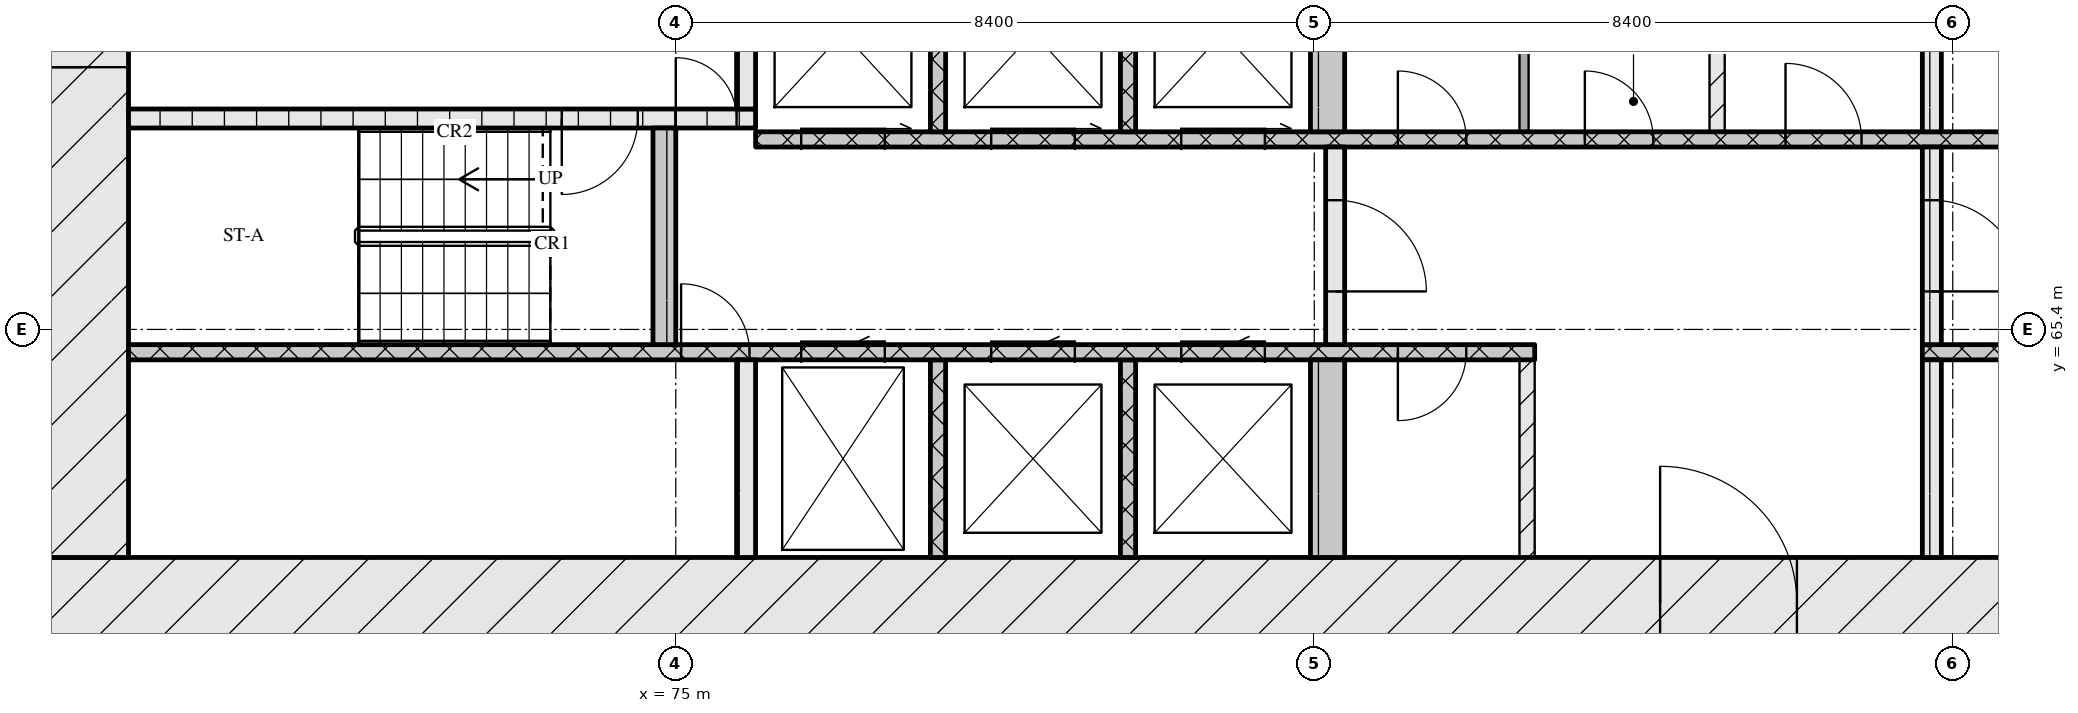
"""IFC4 building model, lengths in metres.
Left out: names, types, materials, properties, quantities, classifications, styles, units other than length and angle.
Written with IfcOpenShell. Run it as: python <this file> out.ifc"""

import sys

from ifc_helpers import new_model, si_unit, direction, frame, frame_2d, origin, place, context, subcontext, project, spatial, rectangle, extrude, element, fill, save


model = new_model("IFC4")
c1 = context("Model", 3, precision=1e-05, world=origin(), true_north=direction((0.0, 1.0)))
c2 = subcontext(c1, "Body", "Model", "MODEL_VIEW")
j1 = project(units=[si_unit("LENGTHUNIT", "METRE"), si_unit("PLANEANGLEUNIT", "RADIAN")], contexts=[c1])
p1 = place(None, origin())
s1 = spatial("IfcSite", under=j1, at=p1, CompositionType="ELEMENT")
p2 = place(p1, origin())
s2 = spatial("IfcBuilding", under=s1, at=p2, CompositionType="ELEMENT")
p3 = place(p2, frame((0.0, 0.0, 44.4)))
s3 = spatial("IfcBuildingStorey", under=s2, at=p3, CompositionType="ELEMENT", Elevation=44.4)
p4 = place(p3, frame((66.6, 61.8, 0.0), z_axis=(0.0, 0.0, 1.0), x_axis=(1.0, 0.0, 0.0)))
e1 = element("IfcWall", 1, at=p4, inside=s3, PredefinedType="SOLIDWALL", context=c2, shape_type="SweptSolid", body=[
    extrude(rectangle(XDim=42.0, YDim=1.2, at=frame_2d((21.0, 0.0))), origin(), (0.0, 0.0, 1.0), 3.32),
])
p5 = place(p4, frame((21.35, 0.0, 0.0)))
e2 = element("IfcOpeningElement", 2, at=p5, cuts=e1, PredefinedType="OPENING", context=c2, shape_type="SweptSolid", body=[
    extrude(rectangle(XDim=1.8, YDim=2.1, at=frame_2d((0.9, 1.05))), frame((0.0, 0.61, 0.0), z_axis=(0.0, -1.0, 0.0), x_axis=(1.0, 0.0, 0.0)), (0.0, 0.0, 1.0), 1.22),
])
p6 = place(p3, frame((67.2, 62.4, 0.0), z_axis=(0.0, 0.0, 1.0), x_axis=(0.0, 1.0, 0.0)))
e3 = element("IfcWall", 3, at=p6, inside=s3, PredefinedType="SOLIDWALL", context=c2, shape_type="SweptSolid", body=[
    extrude(rectangle(XDim=12.0, YDim=1.2, at=frame_2d((6.0, 0.0))), origin(), (0.0, 0.0, 1.0), 3.32),
])
p7 = place(p6, frame((6.45, 0.0, 0.0)))
e4 = element("IfcOpeningElement", 4, at=p7, cuts=e3, PredefinedType="OPENING", context=c2, shape_type="SweptSolid", body=[
    extrude(rectangle(XDim=1.2, YDim=2.1, at=frame_2d((0.6, 1.05))), frame((0.0, 0.61, 0.0), z_axis=(0.0, -1.0, 0.0), x_axis=(1.0, 0.0, 0.0)), (0.0, 0.0, 1.0), 1.22),
])
p8 = place(p3, frame((75.925, 62.4, 0.0), z_axis=(0.0, 0.0, 1.0), x_axis=(0.0, 1.0, 0.0)))
e5 = element("IfcWall", 5, at=p8, inside=s3, PredefinedType="SOLIDWALL", context=c2, shape_type="SweptSolid", body=[
    extrude(rectangle(XDim=2.6, YDim=0.25, at=frame_2d((1.3, 0.0))), origin(), (0.0, 0.0, 1.0), 3.32),
])
for number, where, z_axis, x_axis in (
    (6, (78.45, 62.4, 0.0), (0.0, 0.0, 1.0), (0.0, 1.0, 0.0)),
    (7, (80.95, 62.4, 0.0), (0.0, 0.0, 1.0), (0.0, 1.0, 0.0)),
):
    element("IfcWall", number, at=place(p3, frame(where, z_axis=z_axis, x_axis=x_axis)), inside=s3, PredefinedType="SOLIDWALL", context=c2, shape_type="SweptSolid", body=[
        extrude(rectangle(XDim=2.6, YDim=0.2, at=frame_2d((1.3, 0.0))), origin(), (0.0, 0.0, 1.0), 3.32),
    ])
p9 = place(p3, frame((83.575, 62.4, 0.0), z_axis=(0.0, 0.0, 1.0), x_axis=(0.0, 1.0, 0.0)))
e8 = element("IfcWall", 8, at=p9, inside=s3, PredefinedType="SOLIDWALL", context=c2, shape_type="SweptSolid", body=[
    extrude(rectangle(XDim=2.6, YDim=0.45, at=frame_2d((1.3, 0.0))), origin(), (0.0, 0.0, 1.0), 3.32),
])
p10 = place(p3, frame((86.2, 62.4, 0.0), z_axis=(0.0, 0.0, 1.0), x_axis=(0.0, 1.0, 0.0)))
e9 = element("IfcWall", 9, at=p10, inside=s3, PredefinedType="PARTITIONING", context=c2, shape_type="SweptSolid", body=[
    extrude(rectangle(XDim=2.6, YDim=0.2, at=frame_2d((1.3, 0.0))), origin(), (0.0, 0.0, 1.0), 3.32),
])
p11 = place(p3, frame((91.525, 62.4, 0.0), z_axis=(0.0, 0.0, 1.0), x_axis=(0.0, 1.0, 0.0)))
e10 = element("IfcWall", 10, at=p11, inside=s3, PredefinedType="SOLIDWALL", context=c2, shape_type="SweptSolid", body=[
    extrude(rectangle(XDim=2.6, YDim=0.25, at=frame_2d((1.3, 0.0))), origin(), (0.0, 0.0, 1.0), 3.32),
])
p12 = place(p3, frame((67.8, 65.1, 0.0), z_axis=(0.0, 0.0, 1.0), x_axis=(1.0, 0.0, 0.0)))
e11 = element("IfcWall", 11, at=p12, inside=s3, PredefinedType="SOLIDWALL", context=c2, shape_type="SweptSolid", body=[
    extrude(rectangle(XDim=18.5, YDim=0.2, at=frame_2d((9.25, 0.0))), origin(), (0.0, 0.0, 1.0), 3.32),
])
p13 = place(p12, frame((7.27, 0.0, 0.0)))
e12 = element("IfcOpeningElement", 12, at=p13, cuts=e11, PredefinedType="OPENING", context=c2, shape_type="SweptSolid", body=[
    extrude(rectangle(XDim=0.9, YDim=2.1, at=frame_2d((0.45, 1.05))), frame((0.0, 0.11, 0.0), z_axis=(0.0, -1.0, 0.0), x_axis=(1.0, 0.0, 0.0)), (0.0, 0.0, 1.0), 0.22),
])
p14 = place(p12, frame((8.85, 0.0, 0.0)))
e13 = element("IfcOpeningElement", 13, at=p14, cuts=e11, PredefinedType="OPENING", context=c2, shape_type="SweptSolid", body=[
    extrude(rectangle(XDim=1.1, YDim=2.1, at=frame_2d((0.55, 1.05))), frame((0.0, 0.11, 0.0), z_axis=(0.0, -1.0, 0.0), x_axis=(1.0, 0.0, 0.0)), (0.0, 0.0, 1.0), 0.22),
])
p15 = place(p12, frame((11.35, 0.0, 0.0)))
e14 = element("IfcOpeningElement", 14, at=p15, cuts=e11, PredefinedType="OPENING", context=c2, shape_type="SweptSolid", body=[
    extrude(rectangle(XDim=1.1, YDim=2.1, at=frame_2d((0.55, 1.05))), frame((0.0, 0.11, 0.0), z_axis=(0.0, -1.0, 0.0), x_axis=(1.0, 0.0, 0.0)), (0.0, 0.0, 1.0), 0.22),
])
p16 = place(p12, frame((13.85, 0.0, 0.0)))
e15 = element("IfcOpeningElement", 15, at=p16, cuts=e11, PredefinedType="OPENING", context=c2, shape_type="SweptSolid", body=[
    extrude(rectangle(XDim=1.1, YDim=2.1, at=frame_2d((0.55, 1.05))), frame((0.0, 0.11, 0.0), z_axis=(0.0, -1.0, 0.0), x_axis=(1.0, 0.0, 0.0)), (0.0, 0.0, 1.0), 0.22),
])
p17 = place(p12, frame((16.7, 0.0, 0.0)))
e16 = element("IfcOpeningElement", 16, at=p17, cuts=e11, PredefinedType="OPENING", context=c2, shape_type="SweptSolid", body=[
    extrude(rectangle(XDim=0.9, YDim=2.1, at=frame_2d((0.45, 1.05))), frame((0.0, 0.11, 0.0), z_axis=(0.0, -1.0, 0.0), x_axis=(1.0, 0.0, 0.0)), (0.0, 0.0, 1.0), 0.22),
])
p18 = place(p3, frame((91.4, 65.1, 0.0), z_axis=(0.0, 0.0, 1.0), x_axis=(1.0, 0.0, 0.0)))
e17 = element("IfcWall", 17, at=p18, inside=s3, PredefinedType="SOLIDWALL", context=c2, shape_type="SweptSolid", body=[
    extrude(rectangle(XDim=16.0, YDim=0.2, at=frame_2d((8.0, 0.0))), origin(), (0.0, 0.0, 1.0), 3.32),
])
p19 = place(p18, frame((7.83, 0.0, 0.0)))
e18 = element("IfcOpeningElement", 18, at=p19, cuts=e17, PredefinedType="OPENING", context=c2, shape_type="SweptSolid", body=[
    extrude(rectangle(XDim=0.9, YDim=2.1, at=frame_2d((0.45, 1.05))), frame((0.0, 0.11, 0.0), z_axis=(0.0, -1.0, 0.0), x_axis=(1.0, 0.0, 0.0)), (0.0, 0.0, 1.0), 0.22),
])
p20 = place(p3, frame((74.85, 65.2, 0.0), z_axis=(0.0, 0.0, 1.0), x_axis=(0.0, 1.0, 0.0)))
e19 = element("IfcWall", 19, at=p20, inside=s3, PredefinedType="SOLIDWALL", context=c2, shape_type="SweptSolid", body=[
    extrude(rectangle(XDim=2.85, YDim=0.3, at=frame_2d((1.425, 0.0))), origin(), (0.0, 0.0, 1.0), 3.32),
])
p21 = place(p3, frame((83.675, 65.2, 0.0), z_axis=(0.0, 0.0, 1.0), x_axis=(0.0, 1.0, 0.0)))
e20 = element("IfcWall", 20, at=p21, inside=s3, PredefinedType="SOLIDWALL", context=c2, shape_type="SweptSolid", body=[
    extrude(rectangle(XDim=2.6, YDim=0.25, at=frame_2d((1.3, 0.0))), origin(), (0.0, 0.0, 1.0), 3.32),
])
p22 = place(p21, frame((0.7, 0.0, 0.0)))
e21 = element("IfcOpeningElement", 21, at=p22, cuts=e20, PredefinedType="OPENING", context=c2, shape_type="SweptSolid", body=[
    extrude(rectangle(XDim=1.2, YDim=2.1, at=frame_2d((0.6, 1.05))), frame((0.0, 0.135, 0.0), z_axis=(0.0, -1.0, 0.0), x_axis=(1.0, 0.0, 0.0)), (0.0, 0.0, 1.0), 0.27),
])
p23 = place(p3, frame((91.525, 65.2, 0.0), z_axis=(0.0, 0.0, 1.0), x_axis=(0.0, 1.0, 0.0)))
e22 = element("IfcWall", 22, at=p23, inside=s3, PredefinedType="SOLIDWALL", context=c2, shape_type="SweptSolid", body=[
    extrude(rectangle(XDim=2.6, YDim=0.25, at=frame_2d((1.3, 0.0))), origin(), (0.0, 0.0, 1.0), 3.32),
])
p24 = place(p23, frame((0.7, 0.0, 0.0)))
e23 = element("IfcOpeningElement", 23, at=p24, cuts=e22, PredefinedType="OPENING", context=c2, shape_type="SweptSolid", body=[
    extrude(rectangle(XDim=1.2, YDim=2.1, at=frame_2d((0.6, 1.05))), frame((0.0, 0.135, 0.0), z_axis=(0.0, -1.0, 0.0), x_axis=(1.0, 0.0, 0.0)), (0.0, 0.0, 1.0), 0.27),
])
p25 = place(p3, frame((76.05, 67.9, 0.0), z_axis=(0.0, 0.0, 1.0), x_axis=(1.0, 0.0, 0.0)))
e24 = element("IfcWall", 24, at=p25, inside=s3, PredefinedType="SOLIDWALL", context=c2, shape_type="SweptSolid", body=[
    extrude(rectangle(XDim=23.1, YDim=0.2, at=frame_2d((11.55, 0.0))), origin(), (0.0, 0.0, 1.0), 3.32),
])
p26 = place(p25, frame((0.6, 0.0, 0.0)))
e25 = element("IfcOpeningElement", 25, at=p26, cuts=e24, PredefinedType="OPENING", context=c2, shape_type="SweptSolid", body=[
    extrude(rectangle(XDim=1.1, YDim=2.1, at=frame_2d((0.55, 1.05))), frame((0.0, 0.11, 0.0), z_axis=(0.0, -1.0, 0.0), x_axis=(1.0, 0.0, 0.0)), (0.0, 0.0, 1.0), 0.22),
])
p27 = place(p25, frame((3.1, 0.0, 0.0)))
e26 = element("IfcOpeningElement", 26, at=p27, cuts=e24, PredefinedType="OPENING", context=c2, shape_type="SweptSolid", body=[
    extrude(rectangle(XDim=1.1, YDim=2.1, at=frame_2d((0.55, 1.05))), frame((0.0, 0.11, 0.0), z_axis=(0.0, -1.0, 0.0), x_axis=(1.0, 0.0, 0.0)), (0.0, 0.0, 1.0), 0.22),
])
p28 = place(p25, frame((5.6, 0.0, 0.0)))
e27 = element("IfcOpeningElement", 27, at=p28, cuts=e24, PredefinedType="OPENING", context=c2, shape_type="SweptSolid", body=[
    extrude(rectangle(XDim=1.1, YDim=2.1, at=frame_2d((0.55, 1.05))), frame((0.0, 0.11, 0.0), z_axis=(0.0, -1.0, 0.0), x_axis=(1.0, 0.0, 0.0)), (0.0, 0.0, 1.0), 0.22),
])
p29 = place(p25, frame((8.45, 0.0, 0.0)))
e28 = element("IfcOpeningElement", 28, at=p29, cuts=e24, PredefinedType="OPENING", context=c2, shape_type="SweptSolid", body=[
    extrude(rectangle(XDim=0.9, YDim=2.1, at=frame_2d((0.45, 1.05))), frame((0.0, 0.11, 0.0), z_axis=(0.0, -1.0, 0.0), x_axis=(1.0, 0.0, 0.0)), (0.0, 0.0, 1.0), 0.22),
])
p30 = place(p25, frame((10.91, 0.0, 0.0)))
e29 = element("IfcOpeningElement", 29, at=p30, cuts=e24, PredefinedType="OPENING", context=c2, shape_type="SweptSolid", body=[
    extrude(rectangle(XDim=0.9, YDim=2.1, at=frame_2d((0.45, 1.05))), frame((0.0, 0.11, 0.0), z_axis=(0.0, -1.0, 0.0), x_axis=(1.0, 0.0, 0.0)), (0.0, 0.0, 1.0), 0.22),
])
p31 = place(p25, frame((13.55, 0.0, 0.0)))
e30 = element("IfcOpeningElement", 30, at=p31, cuts=e24, PredefinedType="OPENING", context=c2, shape_type="SweptSolid", body=[
    extrude(rectangle(XDim=1.0, YDim=2.1, at=frame_2d((0.5, 1.05))), frame((0.0, 0.11, 0.0), z_axis=(0.0, -1.0, 0.0), x_axis=(1.0, 0.0, 0.0)), (0.0, 0.0, 1.0), 0.22),
])
for number, where, z_axis, x_axis in (
    (31, (78.45, 68.0, 0.0), (0.0, 0.0, 1.0), (0.0, 1.0, 0.0)),
    (32, (80.95, 68.0, 0.0), (0.0, 0.0, 1.0), (0.0, 1.0, 0.0)),
):
    element("IfcWall", number, at=place(p3, frame(where, z_axis=z_axis, x_axis=x_axis)), inside=s3, PredefinedType="SOLIDWALL", context=c2, shape_type="SweptSolid", body=[
        extrude(rectangle(XDim=2.6, YDim=0.2, at=frame_2d((1.3, 0.0))), origin(), (0.0, 0.0, 1.0), 3.32),
    ])
p32 = place(p3, frame((83.575, 68.0, 0.0), z_axis=(0.0, 0.0, 1.0), x_axis=(0.0, 1.0, 0.0)))
e33 = element("IfcWall", 33, at=p32, inside=s3, PredefinedType="SOLIDWALL", context=c2, shape_type="SweptSolid", body=[
    extrude(rectangle(XDim=2.6, YDim=0.45, at=frame_2d((1.3, 0.0))), origin(), (0.0, 0.0, 1.0), 3.32),
])
p33 = place(p3, frame((86.16, 68.0, 0.0), z_axis=(0.0, 0.0, 1.0), x_axis=(0.0, 1.0, 0.0)))
e34 = element("IfcWall", 34, at=p33, inside=s3, PredefinedType="PARTITIONING", context=c2, shape_type="SweptSolid", body=[
    extrude(rectangle(XDim=2.6, YDim=0.12, at=frame_2d((1.3, 0.0))), origin(), (0.0, 0.0, 1.0), 3.32),
])
p34 = place(p3, frame((88.7, 68.0, 0.0), z_axis=(0.0, 0.0, 1.0), x_axis=(0.0, 1.0, 0.0)))
e35 = element("IfcWall", 35, at=p34, inside=s3, PredefinedType="PARTITIONING", context=c2, shape_type="SweptSolid", body=[
    extrude(rectangle(XDim=2.6, YDim=0.2, at=frame_2d((1.3, 0.0))), origin(), (0.0, 0.0, 1.0), 3.32),
])
p35 = place(p3, frame((91.525, 68.0, 0.0), z_axis=(0.0, 0.0, 1.0), x_axis=(0.0, 1.0, 0.0)))
e36 = element("IfcWall", 36, at=p35, inside=s3, PredefinedType="SOLIDWALL", context=c2, shape_type="SweptSolid", body=[
    extrude(rectangle(XDim=2.6, YDim=0.25, at=frame_2d((1.3, 0.0))), origin(), (0.0, 0.0, 1.0), 3.32),
])
p36 = place(p3, frame((67.8, 68.175, 0.0), z_axis=(0.0, 0.0, 1.0), x_axis=(1.0, 0.0, 0.0)))
e37 = element("IfcWall", 37, at=p36, inside=s3, PredefinedType="SOLIDWALL", context=c2, shape_type="SweptSolid", body=[
    extrude(rectangle(XDim=8.25, YDim=0.25, at=frame_2d((4.125, 0.0))), origin(), (0.0, 0.0, 1.0), 3.32),
])
p37 = place(p36, frame((5.7, 0.0, 0.0)))
e38 = element("IfcOpeningElement", 38, at=p37, cuts=e37, PredefinedType="OPENING", context=c2, shape_type="SweptSolid", body=[
    extrude(rectangle(XDim=1.0, YDim=2.1, at=frame_2d((0.5, 1.05))), frame((0.0, 0.135, 0.0), z_axis=(0.0, -1.0, 0.0), x_axis=(1.0, 0.0, 0.0)), (0.0, 0.0, 1.0), 0.27),
])
p38 = place(p36, frame((7.2, 0.0, 0.0)))
e39 = element("IfcOpeningElement", 39, at=p38, cuts=e37, PredefinedType="OPENING", context=c2, shape_type="SweptSolid", body=[
    extrude(rectangle(XDim=0.8, YDim=2.1, at=frame_2d((0.4, 1.05))), frame((0.0, 0.135, 0.0), z_axis=(0.0, -1.0, 0.0), x_axis=(1.0, 0.0, 0.0)), (0.0, 0.0, 1.0), 0.27),
])
p39 = place(p3, frame((75.925, 68.3, 0.0), z_axis=(0.0, 0.0, 1.0), x_axis=(0.0, 1.0, 0.0)))
e40 = element("IfcWall", 40, at=p39, inside=s3, PredefinedType="SOLIDWALL", context=c2, shape_type="SweptSolid", body=[
    extrude(rectangle(XDim=2.3, YDim=0.25, at=frame_2d((1.15, 0.0))), origin(), (0.0, 0.0, 1.0), 3.32),
])
p40 = place(p5, origin())
e41 = element("IfcDoor", 41, at=p40, inside=s3, OperationType="DOUBLE_DOOR_SINGLE_SWING", PredefinedType="DOOR", context=c2, shape_type="SweptSolid", body=[
    extrude(rectangle(XDim=1.8, YDim=2.1, at=frame_2d((0.9, 1.05))), frame((0.0, 0.025, 0.0), z_axis=(0.0, -1.0, 0.0), x_axis=(1.0, 0.0, 0.0)), (0.0, 0.0, 1.0), 0.05),
])
fill(e2, e41)
p41 = place(p13, origin())
e42 = element("IfcDoor", 42, at=p41, inside=s3, OperationType="SINGLE_SWING_LEFT", PredefinedType="DOOR", context=c2, shape_type="SweptSolid", body=[
    extrude(rectangle(XDim=0.9, YDim=2.1, at=frame_2d((0.45, 1.05))), frame((0.0, 0.025, 0.0), z_axis=(0.0, -1.0, 0.0), x_axis=(1.0, 0.0, 0.0)), (0.0, 0.0, 1.0), 0.05),
])
fill(e12, e42)
p42 = place(p14, origin())
e43 = element("IfcDoor", 43, at=p42, inside=s3, OperationType="SLIDING_TO_LEFT", PredefinedType="DOOR", context=c2, shape_type="SweptSolid", body=[
    extrude(rectangle(XDim=1.1, YDim=2.1, at=frame_2d((0.55, 1.05))), frame((0.0, 0.025, 0.0), z_axis=(0.0, -1.0, 0.0), x_axis=(1.0, 0.0, 0.0)), (0.0, 0.0, 1.0), 0.05),
])
fill(e13, e43)
p43 = place(p15, origin())
e44 = element("IfcDoor", 44, at=p43, inside=s3, OperationType="SLIDING_TO_LEFT", PredefinedType="DOOR", context=c2, shape_type="SweptSolid", body=[
    extrude(rectangle(XDim=1.1, YDim=2.1, at=frame_2d((0.55, 1.05))), frame((0.0, 0.025, 0.0), z_axis=(0.0, -1.0, 0.0), x_axis=(1.0, 0.0, 0.0)), (0.0, 0.0, 1.0), 0.05),
])
fill(e14, e44)
p44 = place(p16, origin())
e45 = element("IfcDoor", 45, at=p44, inside=s3, OperationType="SLIDING_TO_LEFT", PredefinedType="DOOR", context=c2, shape_type="SweptSolid", body=[
    extrude(rectangle(XDim=1.1, YDim=2.1, at=frame_2d((0.55, 1.05))), frame((0.0, 0.025, 0.0), z_axis=(0.0, -1.0, 0.0), x_axis=(1.0, 0.0, 0.0)), (0.0, 0.0, 1.0), 0.05),
])
fill(e15, e45)
p45 = place(p17, origin())
e46 = element("IfcDoor", 46, at=p45, inside=s3, OperationType="SINGLE_SWING_RIGHT", PredefinedType="DOOR", context=c2, shape_type="SweptSolid", body=[
    extrude(rectangle(XDim=0.9, YDim=2.1, at=frame_2d((0.45, 1.05))), frame((0.0, 0.025, 0.0), z_axis=(0.0, -1.0, 0.0), x_axis=(1.0, 0.0, 0.0)), (0.0, 0.0, 1.0), 0.05),
])
fill(e16, e46)
p46 = place(p22, origin())
e47 = element("IfcDoor", 47, at=p46, inside=s3, OperationType="SINGLE_SWING_RIGHT", PredefinedType="DOOR", context=c2, shape_type="SweptSolid", body=[
    extrude(rectangle(XDim=1.2, YDim=2.1, at=frame_2d((0.6, 1.05))), frame((0.0, 0.025, 0.0), z_axis=(0.0, -1.0, 0.0), x_axis=(1.0, 0.0, 0.0)), (0.0, 0.0, 1.0), 0.05),
])
fill(e21, e47)
p47 = place(p24, origin())
e48 = element("IfcDoor", 48, at=p47, inside=s3, OperationType="SINGLE_SWING_RIGHT", PredefinedType="DOOR", context=c2, shape_type="SweptSolid", body=[
    extrude(rectangle(XDim=1.2, YDim=2.1, at=frame_2d((0.6, 1.05))), frame((0.0, 0.025, 0.0), z_axis=(0.0, -1.0, 0.0), x_axis=(1.0, 0.0, 0.0)), (0.0, 0.0, 1.0), 0.05),
])
fill(e23, e48)
p48 = place(p26, origin())
e49 = element("IfcDoor", 49, at=p48, inside=s3, OperationType="SLIDING_TO_RIGHT", PredefinedType="DOOR", context=c2, shape_type="SweptSolid", body=[
    extrude(rectangle(XDim=1.1, YDim=2.1, at=frame_2d((0.55, 1.05))), frame((0.0, 0.025, 0.0), z_axis=(0.0, -1.0, 0.0), x_axis=(1.0, 0.0, 0.0)), (0.0, 0.0, 1.0), 0.05),
])
fill(e25, e49)
p49 = place(p27, origin())
e50 = element("IfcDoor", 50, at=p49, inside=s3, OperationType="SLIDING_TO_RIGHT", PredefinedType="DOOR", context=c2, shape_type="SweptSolid", body=[
    extrude(rectangle(XDim=1.1, YDim=2.1, at=frame_2d((0.55, 1.05))), frame((0.0, 0.025, 0.0), z_axis=(0.0, -1.0, 0.0), x_axis=(1.0, 0.0, 0.0)), (0.0, 0.0, 1.0), 0.05),
])
fill(e26, e50)
p50 = place(p28, origin())
e51 = element("IfcDoor", 51, at=p50, inside=s3, OperationType="SLIDING_TO_RIGHT", PredefinedType="DOOR", context=c2, shape_type="SweptSolid", body=[
    extrude(rectangle(XDim=1.1, YDim=2.1, at=frame_2d((0.55, 1.05))), frame((0.0, 0.025, 0.0), z_axis=(0.0, -1.0, 0.0), x_axis=(1.0, 0.0, 0.0)), (0.0, 0.0, 1.0), 0.05),
])
fill(e27, e51)
p51 = place(p29, origin())
e52 = element("IfcDoor", 52, at=p51, inside=s3, OperationType="SINGLE_SWING_LEFT", PredefinedType="DOOR", context=c2, shape_type="SweptSolid", body=[
    extrude(rectangle(XDim=0.9, YDim=2.1, at=frame_2d((0.45, 1.05))), frame((0.0, 0.025, 0.0), z_axis=(0.0, -1.0, 0.0), x_axis=(1.0, 0.0, 0.0)), (0.0, 0.0, 1.0), 0.05),
])
fill(e28, e52)
p52 = place(p30, origin())
e53 = element("IfcDoor", 53, at=p52, inside=s3, OperationType="SINGLE_SWING_LEFT", PredefinedType="DOOR", context=c2, shape_type="SweptSolid", body=[
    extrude(rectangle(XDim=0.9, YDim=2.1, at=frame_2d((0.45, 1.05))), frame((0.0, 0.025, 0.0), z_axis=(0.0, -1.0, 0.0), x_axis=(1.0, 0.0, 0.0)), (0.0, 0.0, 1.0), 0.05),
])
fill(e29, e53)
p53 = place(p31, origin())
e54 = element("IfcDoor", 54, at=p53, inside=s3, OperationType="SINGLE_SWING_LEFT", PredefinedType="DOOR", context=c2, shape_type="SweptSolid", body=[
    extrude(rectangle(XDim=1.0, YDim=2.1, at=frame_2d((0.5, 1.05))), frame((0.0, 0.025, 0.0), z_axis=(0.0, -1.0, 0.0), x_axis=(1.0, 0.0, 0.0)), (0.0, 0.0, 1.0), 0.05),
])
fill(e30, e54)
p54 = place(p37, origin())
e55 = element("IfcDoor", 55, at=p54, inside=s3, OperationType="SINGLE_SWING_RIGHT", PredefinedType="DOOR", context=c2, shape_type="SweptSolid", body=[
    extrude(rectangle(XDim=1.0, YDim=2.1, at=frame_2d((0.5, 1.05))), frame((0.0, 0.025, 0.0), z_axis=(0.0, -1.0, 0.0), x_axis=(1.0, 0.0, 0.0)), (0.0, 0.0, 1.0), 0.05),
])
fill(e38, e55)
p55 = place(p38, origin())
e56 = element("IfcDoor", 56, at=p55, inside=s3, OperationType="SINGLE_SWING_LEFT", PredefinedType="DOOR", context=c2, shape_type="SweptSolid", body=[
    extrude(rectangle(XDim=0.8, YDim=2.1, at=frame_2d((0.4, 1.05))), frame((0.0, 0.025, 0.0), z_axis=(0.0, -1.0, 0.0), x_axis=(1.0, 0.0, 0.0)), (0.0, 0.0, 1.0), 0.05),
])
fill(e39, e56)
p56 = place(p7, origin())
e57 = element("IfcDoor", 57, at=p56, inside=s3, OperationType="SINGLE_SWING_LEFT", PredefinedType="DOOR", context=c2, shape_type="SweptSolid", body=[
    extrude(rectangle(XDim=1.2, YDim=2.1, at=frame_2d((0.6, 1.05))), frame((0.0, 0.025, 0.0), z_axis=(0.0, -1.0, 0.0), x_axis=(1.0, 0.0, 0.0)), (0.0, 0.0, 1.0), 0.05),
])
fill(e4, e57)
save(model, sys.argv[1])
